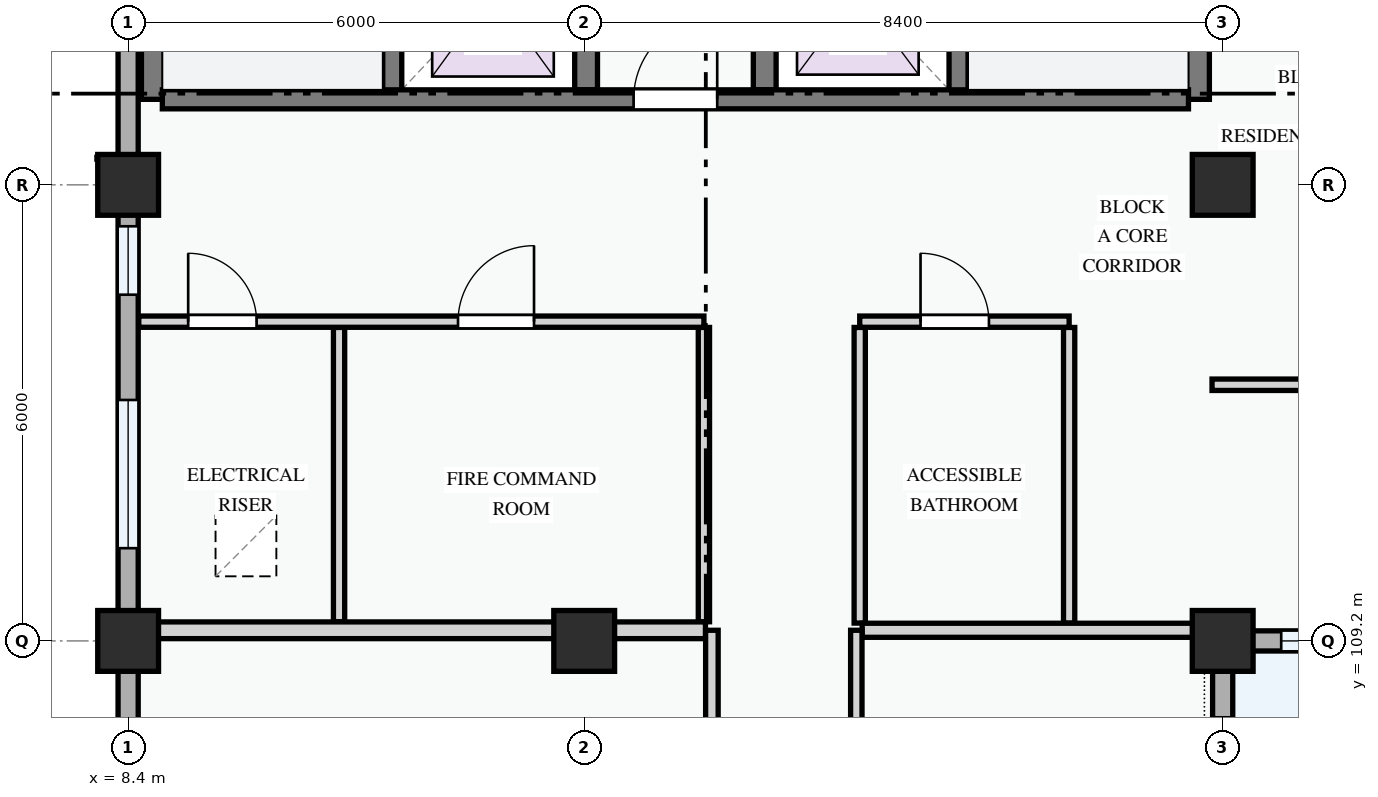
"""IFC4 building model, lengths in metres.
Left out: names, types, materials, properties, quantities, classifications, styles, units other than length and angle.
Written with IfcOpenShell. Run it as: python <this file> out.ifc"""

import sys

from ifc_helpers import new_model, si_unit, direction, frame, frame_2d, origin, origin_2d, place, context, subcontext, project, spatial, rectangle, extrude, element, fill, save


model = new_model("IFC4")
c1 = context("Model", 3, precision=1e-05, world=origin(), true_north=direction((0.0, 1.0)))
c2 = subcontext(c1, "Body", "Model", "MODEL_VIEW")
j1 = project(units=[si_unit("LENGTHUNIT", "METRE"), si_unit("PLANEANGLEUNIT", "RADIAN")], contexts=[c1])
p1 = place(None, origin())
s1 = spatial("IfcSite", under=j1, at=p1, CompositionType="ELEMENT")
p2 = place(p1, origin())
s2 = spatial("IfcBuilding", under=s1, at=p2, CompositionType="ELEMENT")
p3 = place(p2, origin())
s3 = spatial("IfcBuildingStorey", under=s2, at=p3, CompositionType="ELEMENT", Elevation=0.0)
for number, where, z_axis, x_axis in (
    (1, (8.4, 109.2, 0.0), (0.0, 0.0, 1.0), (1.0, 0.0, 0.0)),
    (2, (8.4, 115.2, 0.0), (0.0, 0.0, 1.0), (1.0, 0.0, 0.0)),
    (3, (14.4, 109.2, 0.0), (0.0, 0.0, 1.0), (1.0, 0.0, 0.0)),
    (4, (22.8, 109.2, 0.0), (0.0, 0.0, 1.0), (1.0, 0.0, 0.0)),
    (5, (22.8, 115.2, 0.0), (0.0, 0.0, 1.0), (1.0, 0.0, 0.0)),
):
    element("IfcColumn", number, at=place(p3, frame(where, z_axis=z_axis, x_axis=x_axis)), inside=s3, PredefinedType="COLUMN", context=c2, shape_type="SweptSolid", body=[
        extrude(rectangle(XDim=0.8, YDim=0.8, at=origin_2d()), origin(), (0.0, 0.0, 1.0), 4.5),
    ])
p4 = place(p3, frame((22.8, 109.2, 0.0), z_axis=(0.0, 0.0, 1.0), x_axis=(1.0, 0.0, 0.0)))
e6 = element("IfcWall", 6, at=p4, inside=s3, PredefinedType="STANDARD", context=c2, shape_type="SweptSolid", body=[
    extrude(rectangle(XDim=6.0, YDim=0.265, at=frame_2d((3.0, 0.0))), origin(), (0.0, 0.0, 1.0), 3.585),
])
p5 = place(p4, frame((0.77, 0.0, 0.78)))
e7 = element("IfcOpeningElement", 7, at=p5, cuts=e6, PredefinedType="OPENING", context=c2, shape_type="SweptSolid", body=[
    extrude(rectangle(XDim=1.0, YDim=1.25, at=frame_2d((0.5, 0.625))), frame((0.0, 0.143, 0.0), z_axis=(0.0, -1.0, 0.0), x_axis=(1.0, 0.0, 0.0)), (0.0, 0.0, 1.0), 0.285),
])
p6 = place(p4, frame((3.405, 0.0, 0.78)))
e8 = element("IfcOpeningElement", 8, at=p6, cuts=e6, PredefinedType="OPENING", context=c2, shape_type="SweptSolid", body=[
    extrude(rectangle(XDim=1.35, YDim=1.55, at=frame_2d((0.675, 0.775))), frame((0.0, 0.143, 0.0), z_axis=(0.0, -1.0, 0.0), x_axis=(1.0, 0.0, 0.0)), (0.0, 0.0, 1.0), 0.285),
])
p7 = place(p3, frame((8.4, 123.6, 0.0), z_axis=(0.0, 0.0, 1.0), x_axis=(0.0, -1.0, 0.0)))
e9 = element("IfcWall", 9, at=p7, inside=s3, PredefinedType="STANDARD", context=c2, shape_type="SweptSolid", body=[
    extrude(rectangle(XDim=8.4, YDim=0.265, at=frame_2d((4.2, 0.0))), origin(), (0.0, 0.0, 1.0), 3.485),
])
p8 = place(p7, frame((1.146, 0.0, 0.78)))
e10 = element("IfcOpeningElement", 10, at=p8, cuts=e9, PredefinedType="OPENING", context=c2, shape_type="SweptSolid", body=[
    extrude(rectangle(XDim=1.7, YDim=1.6, at=frame_2d((0.85, 0.8))), frame((0.0, 0.143, 0.0), z_axis=(0.0, -1.0, 0.0), x_axis=(1.0, 0.0, 0.0)), (0.0, 0.0, 1.0), 0.285),
])
p9 = place(p7, frame((4.469, 0.0, 0.78)))
e11 = element("IfcOpeningElement", 11, at=p9, cuts=e9, PredefinedType="OPENING", context=c2, shape_type="SweptSolid", body=[
    extrude(rectangle(XDim=2.0, YDim=1.5, at=frame_2d((1.0, 0.75))), frame((0.0, 0.143, 0.0), z_axis=(0.0, -1.0, 0.0), x_axis=(1.0, 0.0, 0.0)), (0.0, 0.0, 1.0), 0.285),
])
p10 = place(p3, frame((8.4, 115.2, 0.0), z_axis=(0.0, 0.0, 1.0), x_axis=(0.0, -1.0, 0.0)))
e12 = element("IfcWall", 12, at=p10, inside=s3, PredefinedType="STANDARD", context=c2, shape_type="SweptSolid", body=[
    extrude(rectangle(XDim=6.0, YDim=0.265, at=frame_2d((3.0, 0.0))), origin(), (0.0, 0.0, 1.0), 3.585),
])
p11 = place(p10, frame((0.545, 0.0, 0.78)))
e13 = element("IfcOpeningElement", 13, at=p11, cuts=e12, PredefinedType="OPENING", context=c2, shape_type="SweptSolid", body=[
    extrude(rectangle(XDim=0.9, YDim=1.2, at=frame_2d((0.45, 0.6))), frame((0.0, 0.143, 0.0), z_axis=(0.0, -1.0, 0.0), x_axis=(1.0, 0.0, 0.0)), (0.0, 0.0, 1.0), 0.285),
])
p12 = place(p10, frame((2.83, 0.0, 0.78)))
e14 = element("IfcOpeningElement", 14, at=p12, cuts=e12, PredefinedType="OPENING", context=c2, shape_type="SweptSolid", body=[
    extrude(rectangle(XDim=1.95, YDim=1.65, at=frame_2d((0.975, 0.825))), frame((0.0, 0.143, 0.0), z_axis=(0.0, -1.0, 0.0), x_axis=(1.0, 0.0, 0.0)), (0.0, 0.0, 1.0), 0.285),
])
p13 = place(p3, frame((8.4, 109.2, 0.0), z_axis=(0.0, 0.0, 1.0), x_axis=(0.0, -1.0, 0.0)))
e15 = element("IfcWall", 15, at=p13, inside=s3, PredefinedType="STANDARD", context=c2, shape_type="SweptSolid", body=[
    extrude(rectangle(XDim=8.4, YDim=0.265, at=frame_2d((4.2, 0.0))), origin(), (0.0, 0.0, 1.0), 3.485),
])
p14 = place(p13, frame((1.33, 0.0, 0.78)))
e16 = element("IfcOpeningElement", 16, at=p14, cuts=e15, PredefinedType="OPENING", context=c2, shape_type="SweptSolid", body=[
    extrude(rectangle(XDim=1.8, YDim=1.5, at=frame_2d((0.9, 0.75))), frame((0.0, 0.143, 0.0), z_axis=(0.0, -1.0, 0.0), x_axis=(1.0, 0.0, 0.0)), (0.0, 0.0, 1.0), 0.285),
])
p15 = place(p13, frame((5.145, 0.0, 0.78)))
e17 = element("IfcOpeningElement", 17, at=p15, cuts=e15, PredefinedType="OPENING", context=c2, shape_type="SweptSolid", body=[
    extrude(rectangle(XDim=2.05, YDim=1.6, at=frame_2d((1.025, 0.8))), frame((0.0, 0.143, 0.0), z_axis=(0.0, -1.0, 0.0), x_axis=(1.0, 0.0, 0.0)), (0.0, 0.0, 1.0), 0.285),
])
p16 = place(p3, frame((22.8, 100.8, 0.0), z_axis=(0.0, 0.0, 1.0), x_axis=(0.0, 1.0, 0.0)))
e18 = element("IfcWall", 18, at=p16, inside=s3, PredefinedType="STANDARD", context=c2, shape_type="SweptSolid", body=[
    extrude(rectangle(XDim=8.4, YDim=0.265, at=frame_2d((4.2, 0.0))), origin(), (0.0, 0.0, 1.0), 3.485),
])
p17 = place(p16, frame((1.13, 0.0, 0.78)))
e19 = element("IfcOpeningElement", 19, at=p17, cuts=e18, PredefinedType="OPENING", context=c2, shape_type="SweptSolid", body=[
    extrude(rectangle(XDim=2.2, YDim=1.5, at=frame_2d((1.1, 0.75))), frame((0.0, 0.143, 0.0), z_axis=(0.0, -1.0, 0.0), x_axis=(1.0, 0.0, 0.0)), (0.0, 0.0, 1.0), 0.285),
])
p18 = place(p16, frame((4.945, 0.0, 0.78)))
e20 = element("IfcOpeningElement", 20, at=p18, cuts=e18, PredefinedType="OPENING", context=c2, shape_type="SweptSolid", body=[
    extrude(rectangle(XDim=2.45, YDim=1.75, at=frame_2d((1.225, 0.875))), frame((0.0, 0.143, 0.0), z_axis=(0.0, -1.0, 0.0), x_axis=(1.0, 0.0, 0.0)), (0.0, 0.0, 1.0), 0.285),
])
p19 = place(p3, frame((11.875, 123.25, 0.0), z_axis=(0.0, 0.0, 1.0), x_axis=(0.0, -1.0, 0.0)))
e21 = element("IfcWall", 21, at=p19, inside=s3, PredefinedType="SHEAR", context=c2, shape_type="SweptSolid", body=[
    extrude(rectangle(XDim=6.925, YDim=0.25, at=frame_2d((3.462, 0.0))), origin(), (0.0, 0.0, 1.0), 4.2),
])
p20 = place(p19, frame((0.35, 0.0, 0.0)))
e22 = element("IfcOpeningElement", 22, at=p20, cuts=e21, PredefinedType="OPENING", context=c2, shape_type="SweptSolid", body=[
    extrude(rectangle(XDim=0.95, YDim=2.1, at=frame_2d((0.475, 1.05))), frame((0.0, 0.135, 0.0), z_axis=(0.0, -1.0, 0.0), x_axis=(1.0, 0.0, 0.0)), (0.0, 0.0, 1.0), 0.27),
])
p21 = place(p3, frame((8.725, 123.4, 0.0), z_axis=(0.0, 0.0, 1.0), x_axis=(0.0, -1.0, 0.0)))
e23 = element("IfcWall", 23, at=p21, inside=s3, PredefinedType="SHEAR", context=c2, shape_type="SweptSolid", body=[
    extrude(rectangle(XDim=7.075, YDim=0.3, at=frame_2d((3.538, 0.0))), origin(), (0.0, 0.0, 1.0), 4.2),
])
p22 = place(p3, frame((22.475, 123.25, 0.0), z_axis=(0.0, 0.0, 1.0), x_axis=(0.0, -1.0, 0.0)))
e24 = element("IfcWall", 24, at=p22, inside=s3, PredefinedType="SHEAR", context=c2, shape_type="SweptSolid", body=[
    extrude(rectangle(XDim=6.925, YDim=0.3, at=frame_2d((3.462, 0.0))), origin(), (0.0, 0.0, 1.0), 4.2),
])
p23 = place(p3, frame((19.325, 123.25, 0.0), z_axis=(0.0, 0.0, 1.0), x_axis=(0.0, -1.0, 0.0)))
e25 = element("IfcWall", 25, at=p23, inside=s3, PredefinedType="SHEAR", context=c2, shape_type="SweptSolid", body=[
    extrude(rectangle(XDim=6.925, YDim=0.25, at=frame_2d((3.462, 0.0))), origin(), (0.0, 0.0, 1.0), 4.2),
])
p24 = place(p23, frame((0.35, 0.0, 0.0)))
e26 = element("IfcOpeningElement", 26, at=p24, cuts=e25, PredefinedType="OPENING", context=c2, shape_type="SweptSolid", body=[
    extrude(rectangle(XDim=0.95, YDim=2.1, at=frame_2d((0.475, 1.05))), frame((0.0, 0.135, 0.0), z_axis=(0.0, -1.0, 0.0), x_axis=(1.0, 0.0, 0.0)), (0.0, 0.0, 1.0), 0.27),
])
for number, where, z_axis, x_axis in (
    (27, (14.425, 118.875, 0.0), (0.0, 0.0, 1.0), (0.0, -1.0, 0.0)),
    (28, (16.775, 118.875, 0.0), (0.0, 0.0, 1.0), (0.0, -1.0, 0.0)),
):
    element("IfcWall", number, at=place(p3, frame(where, z_axis=z_axis, x_axis=x_axis)), inside=s3, PredefinedType="SHEAR", context=c2, shape_type="SweptSolid", body=[
        extrude(rectangle(XDim=2.425, YDim=0.3, at=frame_2d((1.212, 0.0))), origin(), (0.0, 0.0, 1.0), 4.2),
    ])
p25 = place(p3, frame((8.85, 116.325, 0.0), z_axis=(0.0, 0.0, 1.0), x_axis=(1.0, 0.0, 0.0)))
e29 = element("IfcWall", 29, at=p25, inside=s3, PredefinedType="SHEAR", context=c2, shape_type="SweptSolid", body=[
    extrude(rectangle(XDim=13.5, YDim=0.25, at=frame_2d((6.75, 0.0))), origin(), (0.0, 0.0, 1.0), 4.2),
])
p26 = place(p25, frame((6.2, 0.0, 0.0)))
e30 = element("IfcOpeningElement", 30, at=p26, cuts=e29, PredefinedType="OPENING", context=c2, shape_type="SweptSolid", body=[
    extrude(rectangle(XDim=1.1, YDim=2.15, at=frame_2d((0.55, 1.075))), frame((0.0, 0.135, 0.0), z_axis=(0.0, -1.0, 0.0), x_axis=(1.0, 0.0, 0.0)), (0.0, 0.0, 1.0), 0.27),
])
for number, where, z_axis, x_axis in (
    (31, (11.175, 113.324, 0.0), (0.0, 0.0, 1.0), (0.0, -1.0, 0.0)),
    (32, (15.975, 113.324, 0.0), (0.0, 0.0, 1.0), (0.0, -1.0, 0.0)),
):
    element("IfcWall", number, at=place(p3, frame(where, z_axis=z_axis, x_axis=x_axis)), inside=s3, PredefinedType="PARTITIONING", context=c2, shape_type="SweptSolid", body=[
        extrude(rectangle(XDim=3.872, YDim=0.148, at=frame_2d((1.936, 0.0))), origin(), (0.0, 0.0, 1.0), 4.2),
    ])
for number, where, z_axis, x_axis in (
    (33, (18.025, 113.324, 0.0), (0.0, 0.0, 1.0), (0.0, -1.0, 0.0)),
    (34, (20.78, 113.324, 0.0), (0.0, 0.0, 1.0), (0.0, -1.0, 0.0)),
):
    element("IfcWall", number, at=place(p3, frame(where, z_axis=z_axis, x_axis=x_axis)), inside=s3, PredefinedType="PARTITIONING", context=c2, shape_type="SweptSolid", body=[
        extrude(rectangle(XDim=3.889, YDim=0.148, at=frame_2d((1.945, 0.0))), origin(), (0.0, 0.0, 1.0), 4.2),
    ])
p27 = place(p3, frame((8.54, 113.4, 0.0), z_axis=(0.0, 0.0, 1.0), x_axis=(1.0, 0.0, 0.0)))
e35 = element("IfcWall", 35, at=p27, inside=s3, PredefinedType="PARTITIONING", context=c2, shape_type="SweptSolid", body=[
    extrude(rectangle(XDim=7.435, YDim=0.148, at=frame_2d((3.718, 0.0))), origin(), (0.0, 0.0, 1.0), 4.2),
])
p28 = place(p27, frame((0.65, 0.0, 0.0)))
e36 = element("IfcOpeningElement", 36, at=p28, cuts=e35, PredefinedType="OPENING", context=c2, shape_type="SweptSolid", body=[
    extrude(rectangle(XDim=0.9, YDim=2.1, at=frame_2d((0.45, 1.05))), frame((0.0, 0.084, 0.0), z_axis=(0.0, -1.0, 0.0), x_axis=(1.0, 0.0, 0.0)), (0.0, 0.0, 1.0), 0.168),
])
p29 = place(p27, frame((4.2, 0.0, 0.0)))
e37 = element("IfcOpeningElement", 37, at=p29, cuts=e35, PredefinedType="OPENING", context=c2, shape_type="SweptSolid", body=[
    extrude(rectangle(XDim=1.0, YDim=2.15, at=frame_2d((0.5, 1.075))), frame((0.0, 0.084, 0.0), z_axis=(0.0, -1.0, 0.0), x_axis=(1.0, 0.0, 0.0)), (0.0, 0.0, 1.0), 0.168),
])
p30 = place(p3, frame((18.025, 113.4, 0.0), z_axis=(0.0, 0.0, 1.0), x_axis=(1.0, 0.0, 0.0)))
e38 = element("IfcWall", 38, at=p30, inside=s3, PredefinedType="PARTITIONING", context=c2, shape_type="SweptSolid", body=[
    extrude(rectangle(XDim=2.755, YDim=0.148, at=frame_2d((1.377, 0.0))), origin(), (0.0, 0.0, 1.0), 4.2),
])
p31 = place(p30, frame((0.8, 0.0, 0.0)))
e39 = element("IfcOpeningElement", 39, at=p31, cuts=e38, PredefinedType="OPENING", context=c2, shape_type="SweptSolid", body=[
    extrude(rectangle(XDim=0.9, YDim=2.1, at=frame_2d((0.45, 1.05))), frame((0.0, 0.084, 0.0), z_axis=(0.0, -1.0, 0.0), x_axis=(1.0, 0.0, 0.0)), (0.0, 0.0, 1.0), 0.168),
])
p32 = place(p3, frame((22.66, 112.57, 0.0), z_axis=(0.0, 0.0, 1.0), x_axis=(1.0, 0.0, 0.0)))
e40 = element("IfcWall", 40, at=p32, inside=s3, PredefinedType="PARTITIONING", context=c2, shape_type="SweptSolid", body=[
    extrude(rectangle(XDim=2.406, YDim=0.15, at=frame_2d((1.203, 0.0))), origin(), (0.0, 0.0, 1.0), 4.2),
])
p33 = place(p3, frame((8.534, 109.34, 0.0), z_axis=(0.0, 0.0, 1.0), x_axis=(1.0, 0.0, 0.0)))
e41 = element("IfcWall", 41, at=p33, inside=s3, PredefinedType="PARTITIONING", context=c2, shape_type="SweptSolid", body=[
    extrude(rectangle(XDim=7.461, YDim=0.22, at=frame_2d((3.73, 0.0))), origin(), (0.0, 0.0, 1.0), 3.485),
])
p34 = place(p3, frame((18.057, 109.34, 0.0), z_axis=(0.0, 0.0, 1.0), x_axis=(1.0, 0.0, 0.0)))
e42 = element("IfcWall", 42, at=p34, inside=s3, PredefinedType="PARTITIONING", context=c2, shape_type="SweptSolid", body=[
    extrude(rectangle(XDim=4.683, YDim=0.185, at=frame_2d((2.342, 0.0))), origin(), (0.0, 0.0, 1.0), 3.485),
])
p35 = place(p3, frame((16.08, 72.135, 0.0), z_axis=(0.0, 0.0, 1.0), x_axis=(0.0, 1.0, 0.0)))
e43 = element("IfcWall", 43, at=p35, inside=s3, PredefinedType="PARTITIONING", context=c2, shape_type="SweptSolid", body=[
    extrude(rectangle(XDim=37.206, YDim=0.165, at=frame_2d((18.603, 0.0))), origin(), (0.0, 0.0, 1.0), 4.2),
])
p36 = place(p35, frame((3.566, 0.0, 0.0)))
e44 = element("IfcOpeningElement", 44, at=p36, cuts=e43, PredefinedType="OPENING", context=c2, shape_type="SweptSolid", body=[
    extrude(rectangle(XDim=0.95, YDim=2.1, at=frame_2d((0.475, 1.05))), frame((0.0, 0.093, 0.0), z_axis=(0.0, -1.0, 0.0), x_axis=(1.0, 0.0, 0.0)), (0.0, 0.0, 1.0), 0.185),
])
p37 = place(p35, frame((18.091, 0.0, 0.0)))
e45 = element("IfcOpeningElement", 45, at=p37, cuts=e43, PredefinedType="OPENING", context=c2, shape_type="SweptSolid", body=[
    extrude(rectangle(XDim=0.95, YDim=2.1, at=frame_2d((0.475, 1.05))), frame((0.0, 0.093, 0.0), z_axis=(0.0, -1.0, 0.0), x_axis=(1.0, 0.0, 0.0)), (0.0, 0.0, 1.0), 0.185),
])
p38 = place(p35, frame((32.276, 0.0, 0.0)))
e46 = element("IfcOpeningElement", 46, at=p38, cuts=e43, PredefinedType="OPENING", context=c2, shape_type="SweptSolid", body=[
    extrude(rectangle(XDim=0.95, YDim=2.1, at=frame_2d((0.475, 1.05))), frame((0.0, 0.093, 0.0), z_axis=(0.0, -1.0, 0.0), x_axis=(1.0, 0.0, 0.0)), (0.0, 0.0, 1.0), 0.185),
])
p39 = place(p3, frame((17.98, 72.135, 0.0), z_axis=(0.0, 0.0, 1.0), x_axis=(0.0, 1.0, 0.0)))
e47 = element("IfcWall", 47, at=p39, inside=s3, PredefinedType="PARTITIONING", context=c2, shape_type="SweptSolid", body=[
    extrude(rectangle(XDim=37.206, YDim=0.15, at=frame_2d((18.603, 0.0))), origin(), (0.0, 0.0, 1.0), 4.2),
])
p40 = place(p39, frame((3.563, 0.0, 0.0)))
e48 = element("IfcOpeningElement", 48, at=p40, cuts=e47, PredefinedType="OPENING", context=c2, shape_type="SweptSolid", body=[
    extrude(rectangle(XDim=0.92, YDim=2.1, at=frame_2d((0.46, 1.05))), frame((0.0, 0.085, 0.0), z_axis=(0.0, -1.0, 0.0), x_axis=(1.0, 0.0, 0.0)), (0.0, 0.0, 1.0), 0.17),
])
p41 = place(p39, frame((18.085, 0.0, 0.0)))
e49 = element("IfcOpeningElement", 49, at=p41, cuts=e47, PredefinedType="OPENING", context=c2, shape_type="SweptSolid", body=[
    extrude(rectangle(XDim=0.96, YDim=2.12, at=frame_2d((0.48, 1.06))), frame((0.0, 0.085, 0.0), z_axis=(0.0, -1.0, 0.0), x_axis=(1.0, 0.0, 0.0)), (0.0, 0.0, 1.0), 0.17),
])
p42 = place(p39, frame((32.269, 0.0, 0.0)))
e50 = element("IfcOpeningElement", 50, at=p42, cuts=e47, PredefinedType="OPENING", context=c2, shape_type="SweptSolid", body=[
    extrude(rectangle(XDim=0.92, YDim=2.1, at=frame_2d((0.46, 1.05))), frame((0.0, 0.085, 0.0), z_axis=(0.0, -1.0, 0.0), x_axis=(1.0, 0.0, 0.0)), (0.0, 0.0, 1.0), 0.17),
])
p43 = place(p5, origin())
e51 = element("IfcWindow", 51, at=p43, inside=s3, PartitioningType="SINGLE_PANEL", PredefinedType="WINDOW", context=c2, shape_type="SweptSolid", body=[
    extrude(rectangle(XDim=1.0, YDim=1.25, at=frame_2d((0.5, 0.625))), frame((0.0, 0.03, 0.0), z_axis=(0.0, -1.0, 0.0), x_axis=(1.0, 0.0, 0.0)), (0.0, 0.0, 1.0), 0.06),
])
fill(e7, e51)
p44 = place(p11, origin())
e52 = element("IfcWindow", 52, at=p44, inside=s3, PartitioningType="SINGLE_PANEL", PredefinedType="WINDOW", context=c2, shape_type="SweptSolid", body=[
    extrude(rectangle(XDim=0.9, YDim=1.2, at=frame_2d((0.45, 0.6))), frame((0.0, 0.03, 0.0), z_axis=(0.0, -1.0, 0.0), x_axis=(1.0, 0.0, 0.0)), (0.0, 0.0, 1.0), 0.06),
])
fill(e13, e52)
p45 = place(p12, origin())
e53 = element("IfcWindow", 53, at=p45, inside=s3, PartitioningType="DOUBLE_PANEL_VERTICAL", PredefinedType="WINDOW", context=c2, shape_type="SweptSolid", body=[
    extrude(rectangle(XDim=1.95, YDim=1.65, at=frame_2d((0.975, 0.825))), frame((0.0, 0.03, 0.0), z_axis=(0.0, -1.0, 0.0), x_axis=(1.0, 0.0, 0.0)), (0.0, 0.0, 1.0), 0.06),
])
fill(e14, e53)
p46 = place(p26, origin())
e54 = element("IfcDoor", 54, at=p46, inside=s3, OperationType="SINGLE_SWING_RIGHT", PredefinedType="DOOR", context=c2, shape_type="SweptSolid", body=[
    extrude(rectangle(XDim=1.1, YDim=2.15, at=frame_2d((0.55, 1.075))), frame((0.0, 0.025, 0.0), z_axis=(0.0, -1.0, 0.0), x_axis=(1.0, 0.0, 0.0)), (0.0, 0.0, 1.0), 0.05),
])
fill(e30, e54)
p47 = place(p28, origin())
e55 = element("IfcDoor", 55, at=p47, inside=s3, OperationType="SINGLE_SWING_LEFT", PredefinedType="DOOR", context=c2, shape_type="SweptSolid", body=[
    extrude(rectangle(XDim=0.9, YDim=2.1, at=frame_2d((0.45, 1.05))), frame((0.0, 0.025, 0.0), z_axis=(0.0, -1.0, 0.0), x_axis=(1.0, 0.0, 0.0)), (0.0, 0.0, 1.0), 0.05),
])
fill(e36, e55)
p48 = place(p29, origin())
e56 = element("IfcDoor", 56, at=p48, inside=s3, OperationType="SINGLE_SWING_RIGHT", PredefinedType="DOOR", context=c2, shape_type="SweptSolid", body=[
    extrude(rectangle(XDim=1.0, YDim=2.15, at=frame_2d((0.5, 1.075))), frame((0.0, 0.025, 0.0), z_axis=(0.0, -1.0, 0.0), x_axis=(1.0, 0.0, 0.0)), (0.0, 0.0, 1.0), 0.05),
])
fill(e37, e56)
p49 = place(p31, origin())
e57 = element("IfcDoor", 57, at=p49, inside=s3, OperationType="SINGLE_SWING_LEFT", PredefinedType="DOOR", context=c2, shape_type="SweptSolid", body=[
    extrude(rectangle(XDim=0.9, YDim=2.1, at=frame_2d((0.45, 1.05))), frame((0.0, 0.025, 0.0), z_axis=(0.0, -1.0, 0.0), x_axis=(1.0, 0.0, 0.0)), (0.0, 0.0, 1.0), 0.05),
])
fill(e39, e57)
save(model, sys.argv[1])
